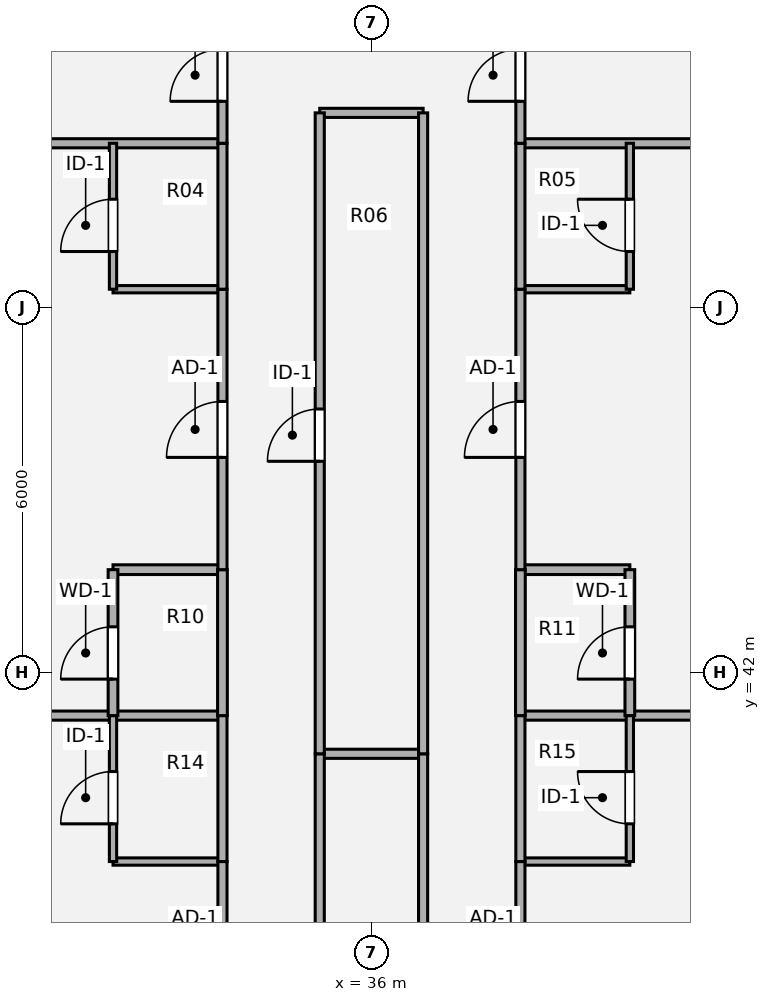
"""IFC4 building model, lengths in metres.
Left out: names, types, materials, properties, quantities, classifications, styles, units other than length and angle.
Written with IfcOpenShell. Run it as: python <this file> out.ifc"""

import sys

from ifc_helpers import new_model, si_unit, direction, frame, frame_2d, origin, origin_2d, place, context, subcontext, project, spatial, rectangle, extrude, source, transform, mapped, element, fill, save


model = new_model("IFC4")
c1 = context("Model", 3, precision=1e-05, world=origin(), true_north=direction((0.0, 1.0)))
c2 = subcontext(c1, "Body", "Model", "MODEL_VIEW")
j1 = project(units=[si_unit("LENGTHUNIT", "METRE"), si_unit("PLANEANGLEUNIT", "RADIAN")], contexts=[c1])
p1 = place(None, origin())
s1 = spatial("IfcSite", under=j1, at=p1, CompositionType="ELEMENT")
p2 = place(p1, origin())
s2 = spatial("IfcBuilding", under=s1, at=p2, CompositionType="ELEMENT")
p3 = place(p2, frame((0.0, 0.0, 160.2)))
s3 = spatial("IfcBuildingStorey", under=s2, at=p3, CompositionType="ELEMENT", Elevation=160.2)
for number, where, z_axis, x_axis in (
    (1, (31.75, 38.888, 0.0), (0.0, 0.0, 1.0), (1.0, 0.0, 0.0)),
    (2, (38.45, 38.888, 0.0), (0.0, 0.0, 1.0), (1.0, 0.0, 0.0)),
):
    element("IfcWall", number, at=place(p3, frame(where, z_axis=z_axis, x_axis=x_axis)), inside=s3, PredefinedType="PARTITIONING", context=c2, shape_type="SweptSolid", body=[
        extrude(rectangle(XDim=1.8, YDim=0.12, at=frame_2d((0.9, 0.0))), origin(), (0.0, 0.0, 1.0), 3.259),
    ])
p4 = place(p3, frame((35.15, 40.66, 0.0), z_axis=(0.0, 0.0, 1.0), x_axis=(1.0, 0.0, 0.0)))
e3 = element("IfcWall", 3, at=p4, inside=s3, PredefinedType="PARTITIONING", context=c2, shape_type="SweptSolid", body=[
    extrude(rectangle(XDim=1.7, YDim=0.15, at=frame_2d((0.85, 0.0))), origin(), (0.0, 0.0, 1.0), 3.259),
])
for number, where, z_axis, x_axis in (
    (4, (15.88, 41.288, 0.0), (0.0, 0.0, 1.0), (1.0, 0.0, 0.0)),
    (5, (38.45, 41.288, 0.0), (0.0, 0.0, 1.0), (1.0, 0.0, 0.0)),
):
    element("IfcWall", number, at=place(p3, frame(where, z_axis=z_axis, x_axis=x_axis)), inside=s3, PredefinedType="PARTITIONING", context=c2, shape_type="SweptSolid", body=[
        extrude(rectangle(XDim=17.67, YDim=0.15, at=frame_2d((8.835, 0.0))), origin(), (0.0, 0.0, 1.0), 2.982),
    ])
for number, where, z_axis, x_axis in (
    (6, (31.75, 43.688, 0.0), (0.0, 0.0, 1.0), (1.0, 0.0, 0.0)),
    (7, (38.45, 43.688, 0.0), (0.0, 0.0, 1.0), (1.0, 0.0, 0.0)),
):
    element("IfcWall", number, at=place(p3, frame(where, z_axis=z_axis, x_axis=x_axis)), inside=s3, PredefinedType="PLUMBINGWALL", context=c2, shape_type="SweptSolid", body=[
        extrude(rectangle(XDim=1.8, YDim=0.16, at=frame_2d((0.9, 0.0))), origin(), (0.0, 0.0, 1.0), 3.259),
    ])
for number, where, z_axis, x_axis in (
    (8, (31.75, 48.3, 0.0), (0.0, 0.0, 1.0), (1.0, 0.0, 0.0)),
    (9, (38.45, 48.3, 0.0), (0.0, 0.0, 1.0), (1.0, 0.0, 0.0)),
):
    element("IfcWall", number, at=place(p3, frame(where, z_axis=z_axis, x_axis=x_axis)), inside=s3, PredefinedType="PARTITIONING", context=c2, shape_type="SweptSolid", body=[
        extrude(rectangle(XDim=1.8, YDim=0.12, at=frame_2d((0.9, 0.0))), origin(), (0.0, 0.0, 1.0), 3.259),
    ])
for number, where, z_axis, x_axis in (
    (10, (15.981, 50.7, 0.0), (0.0, 0.0, 1.0), (1.0, 0.0, 0.0)),
    (11, (38.45, 50.7, 0.0), (0.0, 0.0, 1.0), (1.0, 0.0, 0.0)),
):
    element("IfcWall", number, at=place(p3, frame(where, z_axis=z_axis, x_axis=x_axis)), inside=s3, PredefinedType="PARTITIONING", context=c2, shape_type="SweptSolid", body=[
        extrude(rectangle(XDim=17.569, YDim=0.15, at=frame_2d((8.785, 0.0))), origin(), (0.0, 0.0, 1.0), 3.308),
    ])
p5 = place(p3, frame((35.15, 51.2, 0.0), z_axis=(0.0, 0.0, 1.0), x_axis=(1.0, 0.0, 0.0)))
e12 = element("IfcWall", 12, at=p5, inside=s3, PredefinedType="PARTITIONING", context=c2, shape_type="SweptSolid", body=[
    extrude(rectangle(XDim=1.7, YDim=0.15, at=frame_2d((0.85, 0.0))), origin(), (0.0, 0.0, 1.0), 3.308),
])
p6 = place(p3, frame((31.75, 38.888, 0.0), z_axis=(0.0, 0.0, 1.0), x_axis=(0.0, 1.0, 0.0)))
e13 = element("IfcWall", 13, at=p6, inside=s3, PredefinedType="PARTITIONING", context=c2, shape_type="SweptSolid", body=[
    extrude(rectangle(XDim=2.4, YDim=0.12, at=frame_2d((1.2, 0.0))), origin(), (0.0, 0.0, 1.0), 3.5),
])
p7 = place(p6, frame((0.62, 0.0, 0.0)))
e14 = element("IfcOpeningElement", 14, at=p7, cuts=e13, PredefinedType="OPENING", context=c2, shape_type="SweptSolid", body=[
    extrude(rectangle(XDim=0.86, YDim=2.1, at=origin_2d()), frame((0.43, 0.07, 1.05), z_axis=(0.0, -1.0, 0.0), x_axis=(1.0, 0.0, 0.0)), (0.0, 0.0, 1.0), 0.14),
])
p8 = place(p3, frame((31.75, 41.288, 0.0), z_axis=(0.0, 0.0, 1.0), x_axis=(0.0, 1.0, 0.0)))
e15 = element("IfcWall", 15, at=p8, inside=s3, PredefinedType="PLUMBINGWALL", context=c2, shape_type="SweptSolid", body=[
    extrude(rectangle(XDim=2.4, YDim=0.16, at=frame_2d((1.2, 0.0))), origin(), (0.0, 0.0, 1.0), 3.5),
])
p9 = place(p8, frame((0.6, 0.0, 0.0)))
e16 = element("IfcOpeningElement", 16, at=p9, cuts=e15, PredefinedType="OPENING", context=c2, shape_type="SweptSolid", body=[
    extrude(rectangle(XDim=0.86, YDim=2.1, at=origin_2d()), frame((0.43, 0.09, 1.05), z_axis=(0.0, -1.0, 0.0), x_axis=(1.0, 0.0, 0.0)), (0.0, 0.0, 1.0), 0.18),
])
p10 = place(p3, frame((31.75, 48.3, 0.0), z_axis=(0.0, 0.0, 1.0), x_axis=(0.0, 1.0, 0.0)))
e17 = element("IfcWall", 17, at=p10, inside=s3, PredefinedType="PARTITIONING", context=c2, shape_type="SweptSolid", body=[
    extrude(rectangle(XDim=2.4, YDim=0.12, at=frame_2d((1.2, 0.0))), origin(), (0.0, 0.0, 1.0), 3.5),
])
p11 = place(p10, frame((0.62, 0.0, 0.0)))
e18 = element("IfcOpeningElement", 18, at=p11, cuts=e17, PredefinedType="OPENING", context=c2, shape_type="SweptSolid", body=[
    extrude(rectangle(XDim=0.86, YDim=2.1, at=origin_2d()), frame((0.43, 0.07, 1.05), z_axis=(0.0, -1.0, 0.0), x_axis=(1.0, 0.0, 0.0)), (0.0, 0.0, 1.0), 0.14),
])
p12 = place(p3, frame((33.55, 35.0, 0.0), z_axis=(0.0, 0.0, 1.0), x_axis=(0.0, 1.0, 0.0)))
e19 = element("IfcWall", 19, at=p12, inside=s3, PredefinedType="PARTITIONING", context=c2, shape_type="SweptSolid", body=[
    extrude(rectangle(XDim=3.888, YDim=0.15, at=frame_2d((1.944, 0.0))), origin(), (0.0, 0.0, 1.0), 3.5),
])
p13 = place(p12, frame((1.484, 0.0, 0.0)))
e20 = element("IfcOpeningElement", 20, at=p13, cuts=e19, PredefinedType="OPENING", context=c2, shape_type="SweptSolid", body=[
    extrude(rectangle(XDim=0.92, YDim=2.1, at=origin_2d()), frame((0.46, 0.085, 1.05), z_axis=(0.0, -1.0, 0.0), x_axis=(1.0, 0.0, 0.0)), (0.0, 0.0, 1.0), 0.17),
])
p14 = place(p3, frame((33.55, 38.888, 0.0), z_axis=(0.0, 0.0, 1.0), x_axis=(0.0, 1.0, 0.0)))
e21 = element("IfcWall", 21, at=p14, inside=s3, PredefinedType="PARTITIONING", context=c2, shape_type="SweptSolid", body=[
    extrude(rectangle(XDim=2.4, YDim=0.15, at=frame_2d((1.2, 0.0))), origin(), (0.0, 0.0, 1.0), 3.5),
])
p15 = place(p3, frame((33.55, 41.288, 0.0), z_axis=(0.0, 0.0, 1.0), x_axis=(0.0, 1.0, 0.0)))
e22 = element("IfcWall", 22, at=p15, inside=s3, PredefinedType="PLUMBINGWALL", context=c2, shape_type="SweptSolid", body=[
    extrude(rectangle(XDim=2.4, YDim=0.16, at=frame_2d((1.2, 0.0))), origin(), (0.0, 0.0, 1.0), 3.5),
])
p16 = place(p3, frame((33.55, 43.688, 0.0), z_axis=(0.0, 0.0, 1.0), x_axis=(0.0, 1.0, 0.0)))
e23 = element("IfcWall", 23, at=p16, inside=s3, PredefinedType="PARTITIONING", context=c2, shape_type="SweptSolid", body=[
    extrude(rectangle(XDim=4.612, YDim=0.15, at=frame_2d((2.306, 0.0))), origin(), (0.0, 0.0, 1.0), 3.5),
])
p17 = place(p16, frame((1.846, 0.0, 0.0)))
e24 = element("IfcOpeningElement", 24, at=p17, cuts=e23, PredefinedType="OPENING", context=c2, shape_type="SweptSolid", body=[
    extrude(rectangle(XDim=0.92, YDim=2.1, at=origin_2d()), frame((0.46, 0.085, 1.05), z_axis=(0.0, -1.0, 0.0), x_axis=(1.0, 0.0, 0.0)), (0.0, 0.0, 1.0), 0.17),
])
p18 = place(p3, frame((33.55, 48.3, 0.0), z_axis=(0.0, 0.0, 1.0), x_axis=(0.0, 1.0, 0.0)))
e25 = element("IfcWall", 25, at=p18, inside=s3, PredefinedType="PARTITIONING", context=c2, shape_type="SweptSolid", body=[
    extrude(rectangle(XDim=2.4, YDim=0.15, at=frame_2d((1.2, 0.0))), origin(), (0.0, 0.0, 1.0), 3.5),
])
p19 = place(p3, frame((33.55, 50.7, 0.0), z_axis=(0.0, 0.0, 1.0), x_axis=(0.0, 1.0, 0.0)))
e26 = element("IfcWall", 26, at=p19, inside=s3, PredefinedType="PARTITIONING", context=c2, shape_type="SweptSolid", body=[
    extrude(rectangle(XDim=2.3, YDim=0.15, at=frame_2d((1.15, 0.0))), origin(), (0.0, 0.0, 1.0), 3.5),
])
p20 = place(p19, frame((0.69, 0.0, 0.0)))
e27 = element("IfcOpeningElement", 27, at=p20, cuts=e26, PredefinedType="OPENING", context=c2, shape_type="SweptSolid", body=[
    extrude(rectangle(XDim=0.86, YDim=2.1, at=origin_2d()), frame((0.43, 0.085, 1.05), z_axis=(0.0, -1.0, 0.0), x_axis=(1.0, 0.0, 0.0)), (0.0, 0.0, 1.0), 0.17),
])
p21 = place(p3, frame((35.15, 25.2, 0.0), z_axis=(0.0, 0.0, 1.0), x_axis=(0.0, 1.0, 0.0)))
e28 = element("IfcWall", 28, at=p21, inside=s3, PredefinedType="PARTITIONING", context=c2, shape_type="SweptSolid", body=[
    extrude(rectangle(XDim=15.46, YDim=0.15, at=frame_2d((7.73, 0.0))), origin(), (0.0, 0.0, 1.0), 3.5),
])
p22 = place(p3, frame((35.15, 40.66, 0.0), z_axis=(0.0, 0.0, 1.0), x_axis=(0.0, 1.0, 0.0)))
e29 = element("IfcWall", 29, at=p22, inside=s3, PredefinedType="PARTITIONING", context=c2, shape_type="SweptSolid", body=[
    extrude(rectangle(XDim=10.54, YDim=0.15, at=frame_2d((5.27, 0.0))), origin(), (0.0, 0.0, 1.0), 3.5),
])
p23 = place(p22, frame((4.81, 0.0, 0.0)))
e30 = element("IfcOpeningElement", 30, at=p23, cuts=e29, PredefinedType="OPENING", context=c2, shape_type="SweptSolid", body=[
    extrude(rectangle(XDim=0.86, YDim=2.1, at=origin_2d()), frame((0.43, 0.085, 1.05), z_axis=(0.0, -1.0, 0.0), x_axis=(1.0, 0.0, 0.0)), (0.0, 0.0, 1.0), 0.17),
])
p24 = place(p3, frame((36.85, 25.2, 0.0), z_axis=(0.0, 0.0, 1.0), x_axis=(0.0, 1.0, 0.0)))
e31 = element("IfcWall", 31, at=p24, inside=s3, PredefinedType="PARTITIONING", context=c2, shape_type="SweptSolid", body=[
    extrude(rectangle(XDim=15.46, YDim=0.15, at=frame_2d((7.73, 0.0))), origin(), (0.0, 0.0, 1.0), 3.5),
])
p25 = place(p24, frame((7.205, 0.0, 0.0)))
e32 = element("IfcOpeningElement", 32, at=p25, cuts=e31, PredefinedType="OPENING", context=c2, shape_type="SweptSolid", body=[
    extrude(rectangle(XDim=1.05, YDim=2.1, at=origin_2d()), frame((0.525, 0.085, 1.05), z_axis=(0.0, -1.0, 0.0), x_axis=(1.0, 0.0, 0.0)), (0.0, 0.0, 1.0), 0.17),
])
p26 = place(p3, frame((36.85, 40.66, 0.0), z_axis=(0.0, 0.0, 1.0), x_axis=(0.0, 1.0, 0.0)))
e33 = element("IfcWall", 33, at=p26, inside=s3, PredefinedType="PARTITIONING", context=c2, shape_type="SweptSolid", body=[
    extrude(rectangle(XDim=10.54, YDim=0.15, at=frame_2d((5.27, 0.0))), origin(), (0.0, 0.0, 1.0), 3.5),
])
p27 = place(p3, frame((38.45, 35.0, 0.0), z_axis=(0.0, 0.0, 1.0), x_axis=(0.0, 1.0, 0.0)))
e34 = element("IfcWall", 34, at=p27, inside=s3, PredefinedType="PARTITIONING", context=c2, shape_type="SweptSolid", body=[
    extrude(rectangle(XDim=3.888, YDim=0.15, at=frame_2d((1.944, 0.0))), origin(), (0.0, 0.0, 1.0), 3.5),
])
p28 = place(p27, frame((1.484, 0.0, 0.0)))
e35 = element("IfcOpeningElement", 35, at=p28, cuts=e34, PredefinedType="OPENING", context=c2, shape_type="SweptSolid", body=[
    extrude(rectangle(XDim=0.92, YDim=2.1, at=origin_2d()), frame((0.46, 0.085, 1.05), z_axis=(0.0, -1.0, 0.0), x_axis=(1.0, 0.0, 0.0)), (0.0, 0.0, 1.0), 0.17),
])
p29 = place(p3, frame((38.45, 38.888, 0.0), z_axis=(0.0, 0.0, 1.0), x_axis=(0.0, 1.0, 0.0)))
e36 = element("IfcWall", 36, at=p29, inside=s3, PredefinedType="PARTITIONING", context=c2, shape_type="SweptSolid", body=[
    extrude(rectangle(XDim=2.4, YDim=0.15, at=frame_2d((1.2, 0.0))), origin(), (0.0, 0.0, 1.0), 3.5),
])
p30 = place(p3, frame((38.45, 41.288, 0.0), z_axis=(0.0, 0.0, 1.0), x_axis=(0.0, 1.0, 0.0)))
e37 = element("IfcWall", 37, at=p30, inside=s3, PredefinedType="PLUMBINGWALL", context=c2, shape_type="SweptSolid", body=[
    extrude(rectangle(XDim=2.4, YDim=0.16, at=frame_2d((1.2, 0.0))), origin(), (0.0, 0.0, 1.0), 3.5),
])
p31 = place(p3, frame((38.45, 43.688, 0.0), z_axis=(0.0, 0.0, 1.0), x_axis=(0.0, 1.0, 0.0)))
e38 = element("IfcWall", 38, at=p31, inside=s3, PredefinedType="PARTITIONING", context=c2, shape_type="SweptSolid", body=[
    extrude(rectangle(XDim=4.612, YDim=0.15, at=frame_2d((2.306, 0.0))), origin(), (0.0, 0.0, 1.0), 3.5),
])
p32 = place(p31, frame((1.846, 0.0, 0.0)))
e39 = element("IfcOpeningElement", 39, at=p32, cuts=e38, PredefinedType="OPENING", context=c2, shape_type="SweptSolid", body=[
    extrude(rectangle(XDim=0.92, YDim=2.1, at=origin_2d()), frame((0.46, 0.085, 1.05), z_axis=(0.0, -1.0, 0.0), x_axis=(1.0, 0.0, 0.0)), (0.0, 0.0, 1.0), 0.17),
])
p33 = place(p3, frame((38.45, 48.3, 0.0), z_axis=(0.0, 0.0, 1.0), x_axis=(0.0, 1.0, 0.0)))
e40 = element("IfcWall", 40, at=p33, inside=s3, PredefinedType="PARTITIONING", context=c2, shape_type="SweptSolid", body=[
    extrude(rectangle(XDim=2.4, YDim=0.15, at=frame_2d((1.2, 0.0))), origin(), (0.0, 0.0, 1.0), 3.5),
])
p34 = place(p3, frame((38.45, 50.7, 0.0), z_axis=(0.0, 0.0, 1.0), x_axis=(0.0, 1.0, 0.0)))
e41 = element("IfcWall", 41, at=p34, inside=s3, PredefinedType="PARTITIONING", context=c2, shape_type="SweptSolid", body=[
    extrude(rectangle(XDim=2.3, YDim=0.15, at=frame_2d((1.15, 0.0))), origin(), (0.0, 0.0, 1.0), 3.5),
])
p35 = place(p34, frame((0.69, 0.0, 0.0)))
e42 = element("IfcOpeningElement", 42, at=p35, cuts=e41, PredefinedType="OPENING", context=c2, shape_type="SweptSolid", body=[
    extrude(rectangle(XDim=0.86, YDim=2.1, at=origin_2d()), frame((0.43, 0.085, 1.05), z_axis=(0.0, -1.0, 0.0), x_axis=(1.0, 0.0, 0.0)), (0.0, 0.0, 1.0), 0.17),
])
p36 = place(p3, frame((40.25, 38.888, 0.0), z_axis=(0.0, 0.0, 1.0), x_axis=(0.0, 1.0, 0.0)))
e43 = element("IfcWall", 43, at=p36, inside=s3, PredefinedType="PARTITIONING", context=c2, shape_type="SweptSolid", body=[
    extrude(rectangle(XDim=2.4, YDim=0.12, at=frame_2d((1.2, 0.0))), origin(), (0.0, 0.0, 1.0), 3.5),
])
p37 = place(p36, frame((0.62, 0.0, 0.0)))
e44 = element("IfcOpeningElement", 44, at=p37, cuts=e43, PredefinedType="OPENING", context=c2, shape_type="SweptSolid", body=[
    extrude(rectangle(XDim=0.86, YDim=2.1, at=origin_2d()), frame((0.43, 0.07, 1.05), z_axis=(0.0, -1.0, 0.0), x_axis=(1.0, 0.0, 0.0)), (0.0, 0.0, 1.0), 0.14),
])
p38 = place(p3, frame((40.25, 41.288, 0.0), z_axis=(0.0, 0.0, 1.0), x_axis=(0.0, 1.0, 0.0)))
e45 = element("IfcWall", 45, at=p38, inside=s3, PredefinedType="PLUMBINGWALL", context=c2, shape_type="SweptSolid", body=[
    extrude(rectangle(XDim=2.4, YDim=0.16, at=frame_2d((1.2, 0.0))), origin(), (0.0, 0.0, 1.0), 3.5),
])
p39 = place(p38, frame((0.6, 0.0, 0.0)))
e46 = element("IfcOpeningElement", 46, at=p39, cuts=e45, PredefinedType="OPENING", context=c2, shape_type="SweptSolid", body=[
    extrude(rectangle(XDim=0.86, YDim=2.1, at=origin_2d()), frame((0.43, 0.09, 1.05), z_axis=(0.0, -1.0, 0.0), x_axis=(1.0, 0.0, 0.0)), (0.0, 0.0, 1.0), 0.18),
])
p40 = place(p3, frame((40.25, 48.3, 0.0), z_axis=(0.0, 0.0, 1.0), x_axis=(0.0, 1.0, 0.0)))
e47 = element("IfcWall", 47, at=p40, inside=s3, PredefinedType="PARTITIONING", context=c2, shape_type="SweptSolid", body=[
    extrude(rectangle(XDim=2.4, YDim=0.12, at=frame_2d((1.2, 0.0))), origin(), (0.0, 0.0, 1.0), 3.5),
])
p41 = place(p40, frame((0.62, 0.0, 0.0)))
e48 = element("IfcOpeningElement", 48, at=p41, cuts=e47, PredefinedType="OPENING", context=c2, shape_type="SweptSolid", body=[
    extrude(rectangle(XDim=0.86, YDim=2.1, at=origin_2d()), frame((0.43, 0.07, 1.05), z_axis=(0.0, -1.0, 0.0), x_axis=(1.0, 0.0, 0.0)), (0.0, 0.0, 1.0), 0.14),
])
m1 = source(origin(), c2, "Body", "SweptSolid", [
    extrude(rectangle(XDim=0.86, YDim=2.1, at=origin_2d()), frame((0.43, 0.025, 1.05), z_axis=(0.0, -1.0, 0.0), x_axis=(1.0, 0.0, 0.0)), (0.0, 0.0, 1.0), 0.05),
])
p42 = place(p7, origin())
e49 = element("IfcDoor", 49, at=p42, inside=s3, OperationType="SINGLE_SWING_LEFT", PredefinedType="DOOR", context=c2, shape_type="MappedRepresentation", body=[
    mapped(m1, transform((0.0, 0.0, 0.0), x_axis=(1.0, 0.0, 0.0), y_axis=(0.0, 1.0, 0.0), z_axis=(0.0, 0.0, 1.0), scale=1.0)),
])
fill(e14, e49)
m2 = source(origin(), c2, "Body", "SweptSolid", [
    extrude(rectangle(XDim=0.86, YDim=2.1, at=origin_2d()), frame((0.43, 0.025, 1.05), z_axis=(0.0, -1.0, 0.0), x_axis=(1.0, 0.0, 0.0)), (0.0, 0.0, 1.0), 0.05),
])
p43 = place(p9, origin())
e50 = element("IfcDoor", 50, at=p43, inside=s3, OperationType="SINGLE_SWING_LEFT", PredefinedType="DOOR", context=c2, shape_type="MappedRepresentation", body=[
    mapped(m2, transform((0.0, 0.0, 0.0), x_axis=(1.0, 0.0, 0.0), y_axis=(0.0, 1.0, 0.0), z_axis=(0.0, 0.0, 1.0), scale=1.0)),
])
fill(e16, e50)
p44 = place(p11, origin())
e51 = element("IfcDoor", 51, at=p44, inside=s3, OperationType="SINGLE_SWING_LEFT", PredefinedType="DOOR", context=c2, shape_type="MappedRepresentation", body=[
    mapped(m1, transform((0.0, 0.0, 0.0), x_axis=(1.0, 0.0, 0.0), y_axis=(0.0, 1.0, 0.0), z_axis=(0.0, 0.0, 1.0), scale=1.0)),
])
fill(e18, e51)
m3 = source(origin(), c2, "Body", "SweptSolid", [
    extrude(rectangle(XDim=0.92, YDim=2.1, at=origin_2d()), frame((0.46, 0.025, 1.05), z_axis=(0.0, -1.0, 0.0), x_axis=(1.0, 0.0, 0.0)), (0.0, 0.0, 1.0), 0.05),
])
p45 = place(p17, origin())
e52 = element("IfcDoor", 52, at=p45, inside=s3, OperationType="SINGLE_SWING_LEFT", PredefinedType="DOOR", context=c2, shape_type="MappedRepresentation", body=[
    mapped(m3, transform((0.0, 0.0, 0.0), x_axis=(1.0, 0.0, 0.0), y_axis=(0.0, 1.0, 0.0), z_axis=(0.0, 0.0, 1.0), scale=1.0)),
])
fill(e24, e52)
p46 = place(p20, origin())
e53 = element("IfcDoor", 53, at=p46, inside=s3, OperationType="SINGLE_SWING_LEFT", PredefinedType="DOOR", context=c2, shape_type="MappedRepresentation", body=[
    mapped(m1, transform((0.0, 0.0, 0.0), x_axis=(1.0, 0.0, 0.0), y_axis=(0.0, 1.0, 0.0), z_axis=(0.0, 0.0, 1.0), scale=1.0)),
])
fill(e27, e53)
p47 = place(p23, origin())
e54 = element("IfcDoor", 54, at=p47, inside=s3, OperationType="SINGLE_SWING_LEFT", PredefinedType="DOOR", context=c2, shape_type="MappedRepresentation", body=[
    mapped(m1, transform((0.0, 0.0, 0.0), x_axis=(1.0, 0.0, 0.0), y_axis=(0.0, 1.0, 0.0), z_axis=(0.0, 0.0, 1.0), scale=1.0)),
])
fill(e30, e54)
p48 = place(p32, origin())
e55 = element("IfcDoor", 55, at=p48, inside=s3, OperationType="SINGLE_SWING_LEFT", PredefinedType="DOOR", context=c2, shape_type="MappedRepresentation", body=[
    mapped(m3, transform((0.0, 0.0, 0.0), x_axis=(1.0, 0.0, 0.0), y_axis=(0.0, 1.0, 0.0), z_axis=(0.0, 0.0, 1.0), scale=1.0)),
])
fill(e39, e55)
p49 = place(p35, origin())
e56 = element("IfcDoor", 56, at=p49, inside=s3, OperationType="SINGLE_SWING_LEFT", PredefinedType="DOOR", context=c2, shape_type="MappedRepresentation", body=[
    mapped(m1, transform((0.0, 0.0, 0.0), x_axis=(1.0, 0.0, 0.0), y_axis=(0.0, 1.0, 0.0), z_axis=(0.0, 0.0, 1.0), scale=1.0)),
])
fill(e42, e56)
p50 = place(p37, origin())
e57 = element("IfcDoor", 57, at=p50, inside=s3, OperationType="SINGLE_SWING_RIGHT", PredefinedType="DOOR", context=c2, shape_type="MappedRepresentation", body=[
    mapped(m1, transform((0.0, 0.0, 0.0), x_axis=(1.0, 0.0, 0.0), y_axis=(0.0, 1.0, 0.0), z_axis=(0.0, 0.0, 1.0), scale=1.0)),
])
fill(e44, e57)
p51 = place(p39, origin())
e58 = element("IfcDoor", 58, at=p51, inside=s3, OperationType="SINGLE_SWING_LEFT", PredefinedType="DOOR", context=c2, shape_type="MappedRepresentation", body=[
    mapped(m2, transform((0.0, 0.0, 0.0), x_axis=(1.0, 0.0, 0.0), y_axis=(0.0, 1.0, 0.0), z_axis=(0.0, 0.0, 1.0), scale=1.0)),
])
fill(e46, e58)
p52 = place(p41, origin())
e59 = element("IfcDoor", 59, at=p52, inside=s3, OperationType="SINGLE_SWING_RIGHT", PredefinedType="DOOR", context=c2, shape_type="MappedRepresentation", body=[
    mapped(m1, transform((0.0, 0.0, 0.0), x_axis=(1.0, 0.0, 0.0), y_axis=(0.0, 1.0, 0.0), z_axis=(0.0, 0.0, 1.0), scale=1.0)),
])
fill(e48, e59)
save(model, sys.argv[1])
